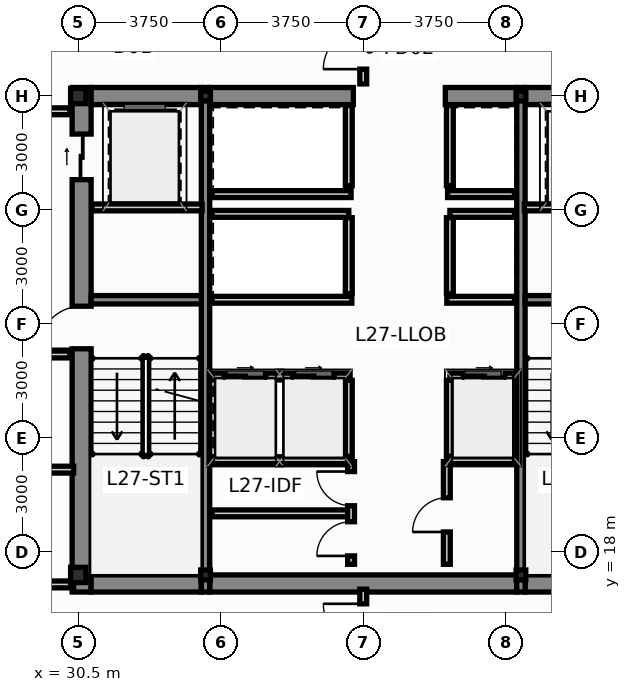
"""IFC4 building model, lengths in metres.
Left out: names, types, materials, properties, quantities, classifications, styles, units other than length and angle.
Written with IfcOpenShell. Run it as: python <this file> out.ifc"""

import sys

from ifc_helpers import new_model, si_unit, direction, frame, frame_2d, origin, origin_2d, place, context, subcontext, project, spatial, rectangle, i_section, extrude, source, transform, mapped, element, fill, save


model = new_model("IFC4")
c1 = context("Model", 3, precision=1e-05, world=origin(), true_north=direction((0.0, 1.0)))
c2 = subcontext(c1, "Body", "Model", "MODEL_VIEW")
j1 = project(units=[si_unit("LENGTHUNIT", "METRE"), si_unit("PLANEANGLEUNIT", "RADIAN")], contexts=[c1])
p1 = place(None, origin())
s1 = spatial("IfcSite", under=j1, at=p1, CompositionType="ELEMENT")
p2 = place(p1, origin())
s2 = spatial("IfcBuilding", under=s1, at=p2, CompositionType="ELEMENT")
p3 = place(p2, frame((0.0, 0.0, 105.4)))
s3 = spatial("IfcBuildingStorey", under=s2, at=p3, CompositionType="ELEMENT", Elevation=105.4)
m1 = source(origin(), c2, "Body", "SweptSolid", [
    extrude(i_section(OverallWidth=0.4, OverallDepth=0.4, WebThickness=0.02, FlangeThickness=0.032, at=origin_2d()), origin(), (0.0, 0.0, 1.0), 3.65),
])
for number, where, z_axis, x_axis in (
    (1, (30.5, 17.4, 0.0), (0.0, 0.0, 1.0), (1.0, 0.0, 0.0)),
    (2, (30.5, 30.0, 0.0), (0.0, 0.0, 1.0), (1.0, 0.0, 0.0)),
):
    element("IfcColumn", number, at=place(p3, frame(where, z_axis=z_axis, x_axis=x_axis)), inside=s3, PredefinedType="COLUMN", context=c2, shape_type="MappedRepresentation", body=[
        mapped(m1, transform((0.0, 0.0, 0.0), scale=1.0)),
    ])
m2 = source(origin(), c2, "Body", "SweptSolid", [
    extrude(i_section(OverallWidth=0.256, OverallDepth=0.26, WebThickness=0.01, FlangeThickness=0.017, at=origin_2d()), origin(), (0.0, 0.0, 1.0), 3.65),
])
for number, where, z_axis, x_axis in (
    (3, (33.85, 17.4, 0.0), (0.0, 0.0, 1.0), (1.0, 0.0, 0.0)),
    (4, (42.15, 17.4, 0.0), (0.0, 0.0, 1.0), (1.0, 0.0, 0.0)),
    (5, (33.85, 30.0, 0.0), (0.0, 0.0, 1.0), (1.0, 0.0, 0.0)),
    (6, (42.15, 30.0, 0.0), (0.0, 0.0, 1.0), (1.0, 0.0, 0.0)),
):
    element("IfcColumn", number, at=place(p3, frame(where, z_axis=z_axis, x_axis=x_axis)), inside=s3, PredefinedType="COLUMN", context=c2, shape_type="MappedRepresentation", body=[
        mapped(m2, transform((0.0, 0.0, 0.0), scale=1.0)),
    ])
p4 = place(p3, frame((30.59, 16.95, 0.0), z_axis=(0.0, 0.0, 1.0), x_axis=(0.0, 1.0, 0.0)))
e7 = element("IfcWall", 7, at=p4, inside=s3, PredefinedType="SHEAR", context=c2, shape_type="SweptSolid", body=[
    extrude(rectangle(XDim=13.275, YDim=0.5, at=frame_2d((6.638, 0.0))), origin(), (0.0, 0.0, 1.0), 3.65),
])
p5 = place(p4, frame((6.4, 0.0, 0.0)))
e8 = element("IfcOpeningElement", 8, at=p5, cuts=e7, PredefinedType="OPENING", context=c2, shape_type="SweptSolid", body=[
    extrude(rectangle(XDim=1.12, YDim=2.15, at=frame_2d((0.56, 1.075))), frame((0.0, 0.262, 0.0), z_axis=(0.0, -1.0, 0.0), x_axis=(1.0, 0.0, 0.0)), (0.0, 0.0, 1.0), 0.524),
])
p6 = place(p4, frame((10.85, 0.0, 0.0)))
e9 = element("IfcOpeningElement", 9, at=p6, cuts=e7, PredefinedType="OPENING", context=c2, shape_type="SweptSolid", body=[
    extrude(rectangle(XDim=1.2, YDim=2.2, at=frame_2d((0.6, 1.1))), frame((0.0, 0.262, 0.0), z_axis=(0.0, -1.0, 0.0), x_axis=(1.0, 0.0, 0.0)), (0.0, 0.0, 1.0), 0.524),
])
p7 = place(p3, frame((30.84, 17.175, 0.0), z_axis=(0.0, 0.0, 1.0), x_axis=(1.0, 0.0, 0.0)))
e10 = element("IfcWall", 10, at=p7, inside=s3, PredefinedType="SHEAR", context=c2, shape_type="SweptSolid", body=[
    extrude(rectangle(XDim=2.9, YDim=0.45, at=frame_2d((1.45, 0.0))), origin(), (0.0, 0.0, 1.0), 3.65),
])
p8 = place(p3, frame((33.96, 17.175, 0.0), z_axis=(0.0, 0.0, 1.0), x_axis=(1.0, 0.0, 0.0)))
e11 = element("IfcWall", 11, at=p8, inside=s3, PredefinedType="SHEAR", context=c2, shape_type="SweptSolid", body=[
    extrude(rectangle(XDim=8.08, YDim=0.45, at=frame_2d((4.04, 0.0))), origin(), (0.0, 0.0, 1.0), 3.65),
])
for number, where, z_axis, x_axis in (
    (12, (42.26, 17.175, 0.0), (0.0, 0.0, 1.0), (1.0, 0.0, 0.0)),
    (13, (30.84, 30.0, 0.0), (0.0, 0.0, 1.0), (1.0, 0.0, 0.0)),
):
    element("IfcWall", number, at=place(p3, frame(where, z_axis=z_axis, x_axis=x_axis)), inside=s3, PredefinedType="SHEAR", context=c2, shape_type="SweptSolid", body=[
        extrude(rectangle(XDim=2.9, YDim=0.45, at=frame_2d((1.45, 0.0))), origin(), (0.0, 0.0, 1.0), 3.65),
    ])
p9 = place(p3, frame((33.96, 30.0, 0.0), z_axis=(0.0, 0.0, 1.0), x_axis=(1.0, 0.0, 0.0)))
e14 = element("IfcWall", 14, at=p9, inside=s3, PredefinedType="SHEAR", context=c2, shape_type="SweptSolid", body=[
    extrude(rectangle(XDim=3.78, YDim=0.45, at=frame_2d((1.89, 0.0))), origin(), (0.0, 0.0, 1.0), 3.65),
])
p10 = place(p3, frame((40.16, 30.0, 0.0), z_axis=(0.0, 0.0, 1.0), x_axis=(1.0, 0.0, 0.0)))
e15 = element("IfcWall", 15, at=p10, inside=s3, PredefinedType="SHEAR", context=c2, shape_type="SweptSolid", body=[
    extrude(rectangle(XDim=1.88, YDim=0.45, at=frame_2d((0.94, 0.0))), origin(), (0.0, 0.0, 1.0), 3.65),
])
p11 = place(p3, frame((42.26, 30.0, 0.0), z_axis=(0.0, 0.0, 1.0), x_axis=(1.0, 0.0, 0.0)))
e16 = element("IfcWall", 16, at=p11, inside=s3, PredefinedType="SHEAR", context=c2, shape_type="SweptSolid", body=[
    extrude(rectangle(XDim=2.9, YDim=0.45, at=frame_2d((1.45, 0.0))), origin(), (0.0, 0.0, 1.0), 3.65),
])
for number, where, z_axis, x_axis in (
    (17, (33.85, 16.95, 0.0), (0.0, 0.0, 1.0), (0.0, 1.0, 0.0)),
    (18, (42.15, 16.95, 0.0), (0.0, 0.0, 1.0), (0.0, 1.0, 0.0)),
):
    element("IfcWall", number, at=place(p3, frame(where, z_axis=z_axis, x_axis=x_axis)), inside=s3, PredefinedType="SHEAR", context=c2, shape_type="SweptSolid", body=[
        extrude(rectangle(XDim=13.275, YDim=0.22, at=frame_2d((6.638, 0.0))), origin(), (0.0, 0.0, 1.0), 3.65),
    ])
for number, where, z_axis, x_axis in (
    (19, (30.84, 24.64, 0.0), (0.0, 0.0, 1.0), (1.0, 0.0, 0.0)),
    (20, (42.26, 24.64, 0.0), (0.0, 0.0, 1.0), (1.0, 0.0, 0.0)),
):
    element("IfcWall", number, at=place(p3, frame(where, z_axis=z_axis, x_axis=x_axis)), inside=s3, PredefinedType="SHEAR", context=c2, shape_type="SweptSolid", body=[
        extrude(rectangle(XDim=2.9, YDim=0.22, at=frame_2d((1.45, 0.0))), origin(), (0.0, 0.0, 1.0), 3.65),
    ])
p12 = place(p3, frame((34.02, 22.62, 0.0), z_axis=(0.0, 0.0, 1.0), x_axis=(1.0, 0.0, 0.0)))
e21 = element("IfcWall", 21, at=p12, inside=s3, PredefinedType="PARTITIONING", context=c2, shape_type="SweptSolid", body=[
    extrude(rectangle(XDim=3.6, YDim=0.18, at=frame_2d((1.8, 0.0))), origin(), (0.0, 0.0, 1.0), 3.4),
])
p13 = place(p12, frame((0.32, 0.0, 0.0)))
e22 = element("IfcOpeningElement", 22, at=p13, cuts=e21, PredefinedType="OPENING", context=c2, shape_type="SweptSolid", body=[
    extrude(rectangle(XDim=1.1, YDim=2.2, at=frame_2d((0.55, 1.1))), frame((0.0, 0.102, 0.0), z_axis=(0.0, -1.0, 0.0), x_axis=(1.0, 0.0, 0.0)), (0.0, 0.0, 1.0), 0.204),
])
p14 = place(p12, frame((2.12, 0.0, 0.0)))
e23 = element("IfcOpeningElement", 23, at=p14, cuts=e21, PredefinedType="OPENING", context=c2, shape_type="SweptSolid", body=[
    extrude(rectangle(XDim=1.1, YDim=2.2, at=frame_2d((0.55, 1.1))), frame((0.0, 0.102, 0.0), z_axis=(0.0, -1.0, 0.0), x_axis=(1.0, 0.0, 0.0)), (0.0, 0.0, 1.0), 0.204),
])
p15 = place(p3, frame((40.28, 22.62, 0.0), z_axis=(0.0, 0.0, 1.0), x_axis=(1.0, 0.0, 0.0)))
e24 = element("IfcWall", 24, at=p15, inside=s3, PredefinedType="PARTITIONING", context=c2, shape_type="SweptSolid", body=[
    extrude(rectangle(XDim=1.7, YDim=0.18, at=frame_2d((0.85, 0.0))), origin(), (0.0, 0.0, 1.0), 3.4),
])
p16 = place(p15, frame((0.35, 0.0, 0.0)))
e25 = element("IfcOpeningElement", 25, at=p16, cuts=e24, PredefinedType="OPENING", context=c2, shape_type="SweptSolid", body=[
    extrude(rectangle(XDim=1.1, YDim=2.2, at=frame_2d((0.55, 1.1))), frame((0.0, 0.102, 0.0), z_axis=(0.0, -1.0, 0.0), x_axis=(1.0, 0.0, 0.0)), (0.0, 0.0, 1.0), 0.204),
])
for number, where, z_axis, x_axis in (
    (26, (37.62, 20.52, 0.0), (0.0, 0.0, 1.0), (0.0, 1.0, 0.0)),
    (27, (40.28, 20.52, 0.0), (0.0, 0.0, 1.0), (0.0, 1.0, 0.0)),
):
    element("IfcWall", number, at=place(p3, frame(where, z_axis=z_axis, x_axis=x_axis)), inside=s3, PredefinedType="PARTITIONING", context=c2, shape_type="SweptSolid", body=[
        extrude(rectangle(XDim=2.0, YDim=0.18, at=frame_2d((1.0, 0.0))), origin(), (0.0, 0.0, 1.0), 3.4),
    ])
p17 = place(p3, frame((34.02, 26.9, 0.0), z_axis=(0.0, 0.0, 1.0), x_axis=(1.0, 0.0, 0.0)))
e28 = element("IfcWall", 28, at=p17, inside=s3, PredefinedType="PARTITIONING", context=c2, shape_type="SweptSolid", body=[
    extrude(rectangle(XDim=3.6, YDim=0.18, at=frame_2d((1.8, 0.0))), origin(), (0.0, 0.0, 1.0), 3.4),
])
p18 = place(p3, frame((40.28, 26.9, 0.0), z_axis=(0.0, 0.0, 1.0), x_axis=(1.0, 0.0, 0.0)))
e29 = element("IfcWall", 29, at=p18, inside=s3, PredefinedType="PARTITIONING", context=c2, shape_type="SweptSolid", body=[
    extrude(rectangle(XDim=1.7, YDim=0.18, at=frame_2d((0.85, 0.0))), origin(), (0.0, 0.0, 1.0), 3.4),
])
for number, where, z_axis, x_axis in (
    (30, (37.62, 24.8, 0.0), (0.0, 0.0, 1.0), (0.0, 1.0, 0.0)),
    (31, (40.28, 24.8, 0.0), (0.0, 0.0, 1.0), (0.0, 1.0, 0.0)),
):
    element("IfcWall", number, at=place(p3, frame(where, z_axis=z_axis, x_axis=x_axis)), inside=s3, PredefinedType="PARTITIONING", context=c2, shape_type="SweptSolid", body=[
        extrude(rectangle(XDim=2.0, YDim=0.18, at=frame_2d((1.0, 0.0))), origin(), (0.0, 0.0, 1.0), 3.4),
    ])
p19 = place(p3, frame((34.02, 24.64, 0.0), z_axis=(0.0, 0.0, 1.0), x_axis=(1.0, 0.0, 0.0)))
e32 = element("IfcWall", 32, at=p19, inside=s3, PredefinedType="PARTITIONING", context=c2, shape_type="SweptSolid", body=[
    extrude(rectangle(XDim=3.68, YDim=0.18, at=frame_2d((1.84, 0.0))), origin(), (0.0, 0.0, 1.0), 3.4),
])
p20 = place(p3, frame((40.2, 24.64, 0.0), z_axis=(0.0, 0.0, 1.0), x_axis=(1.0, 0.0, 0.0)))
e33 = element("IfcWall", 33, at=p20, inside=s3, PredefinedType="PARTITIONING", context=c2, shape_type="SweptSolid", body=[
    extrude(rectangle(XDim=1.78, YDim=0.18, at=frame_2d((0.89, 0.0))), origin(), (0.0, 0.0, 1.0), 3.4),
])
p21 = place(p3, frame((34.02, 27.42, 0.0), z_axis=(0.0, 0.0, 1.0), x_axis=(1.0, 0.0, 0.0)))
e34 = element("IfcWall", 34, at=p21, inside=s3, PredefinedType="PARTITIONING", context=c2, shape_type="SweptSolid", body=[
    extrude(rectangle(XDim=3.66, YDim=0.18, at=frame_2d((1.83, 0.0))), origin(), (0.0, 0.0, 1.0), 3.4),
])
p22 = place(p3, frame((40.22, 27.42, 0.0), z_axis=(0.0, 0.0, 1.0), x_axis=(1.0, 0.0, 0.0)))
e35 = element("IfcWall", 35, at=p22, inside=s3, PredefinedType="PARTITIONING", context=c2, shape_type="SweptSolid", body=[
    extrude(rectangle(XDim=1.76, YDim=0.18, at=frame_2d((0.88, 0.0))), origin(), (0.0, 0.0, 1.0), 3.4),
])
for number, where, z_axis, x_axis in (
    (36, (37.62, 27.64, 0.0), (0.0, 0.0, 1.0), (0.0, 1.0, 0.0)),
    (37, (40.28, 27.64, 0.0), (0.0, 0.0, 1.0), (0.0, 1.0, 0.0)),
):
    element("IfcWall", number, at=place(p3, frame(where, z_axis=z_axis, x_axis=x_axis)), inside=s3, PredefinedType="PARTITIONING", context=c2, shape_type="SweptSolid", body=[
        extrude(rectangle(XDim=2.11, YDim=0.18, at=frame_2d((1.055, 0.0))), origin(), (0.0, 0.0, 1.0), 3.4),
    ])
p23 = place(p3, frame((27.52, 23.2, 0.0), z_axis=(0.0, 0.0, 1.0), x_axis=(1.0, 0.0, 0.0)))
e38 = element("IfcWall", 38, at=p23, inside=s3, PredefinedType="PARTITIONING", context=c2, shape_type="SweptSolid", body=[
    extrude(rectangle(XDim=2.76, YDim=0.18, at=frame_2d((1.38, 0.0))), origin(), (0.0, 0.0, 1.0), 3.4),
])
p24 = place(p3, frame((27.52, 29.6, 0.0), z_axis=(0.0, 0.0, 1.0), x_axis=(1.0, 0.0, 0.0)))
e39 = element("IfcWall", 39, at=p24, inside=s3, PredefinedType="PARTITIONING", context=c2, shape_type="SweptSolid", body=[
    extrude(rectangle(XDim=2.76, YDim=0.18, at=frame_2d((1.38, 0.0))), origin(), (0.0, 0.0, 1.0), 2.783),
])
for number, where, z_axis, x_axis in (
    (40, (30.86, 27.07, 0.0), (0.0, 0.0, 1.0), (1.0, 0.0, 0.0)),
    (41, (42.24, 27.07, 0.0), (0.0, 0.0, 1.0), (1.0, 0.0, 0.0)),
):
    element("IfcWall", number, at=place(p3, frame(where, z_axis=z_axis, x_axis=x_axis)), inside=s3, PredefinedType="PARTITIONING", context=c2, shape_type="SweptSolid", body=[
        extrude(rectangle(XDim=2.9, YDim=0.18, at=frame_2d((1.45, 0.0))), origin(), (0.0, 0.0, 1.0), 3.4),
    ])
p25 = place(p3, frame((34.02, 20.42, 0.0), z_axis=(0.0, 0.0, 1.0), x_axis=(1.0, 0.0, 0.0)))
e42 = element("IfcWall", 42, at=p25, inside=s3, PredefinedType="PARTITIONING", context=c2, shape_type="SweptSolid", body=[
    extrude(rectangle(XDim=3.64, YDim=0.18, at=frame_2d((1.82, 0.0))), origin(), (0.0, 0.0, 1.0), 3.4),
])
p26 = place(p3, frame((40.22, 20.42, 0.0), z_axis=(0.0, 0.0, 1.0), x_axis=(1.0, 0.0, 0.0)))
e43 = element("IfcWall", 43, at=p26, inside=s3, PredefinedType="PARTITIONING", context=c2, shape_type="SweptSolid", body=[
    extrude(rectangle(XDim=1.76, YDim=0.18, at=frame_2d((0.88, 0.0))), origin(), (0.0, 0.0, 1.0), 3.4),
])
p27 = place(p3, frame((34.02, 19.02, 0.0), z_axis=(0.0, 0.0, 1.0), x_axis=(1.0, 0.0, 0.0)))
e44 = element("IfcWall", 44, at=p27, inside=s3, PredefinedType="PARTITIONING", context=c2, shape_type="SweptSolid", body=[
    extrude(rectangle(XDim=3.58, YDim=0.18, at=frame_2d((1.79, 0.0))), origin(), (0.0, 0.0, 1.0), 3.4),
])
p28 = place(p3, frame((37.68, 17.68, 0.0), z_axis=(0.0, 0.0, 1.0), x_axis=(0.0, 1.0, 0.0)))
e45 = element("IfcWall", 45, at=p28, inside=s3, PredefinedType="PARTITIONING", context=c2, shape_type="SweptSolid", body=[
    extrude(rectangle(XDim=2.7, YDim=0.18, at=frame_2d((1.35, 0.0))), origin(), (0.0, 0.0, 1.0), 3.4),
])
p29 = place(p28, frame((0.22, 0.0, 0.0)))
e46 = element("IfcOpeningElement", 46, at=p29, cuts=e45, PredefinedType="OPENING", context=c2, shape_type="SweptSolid", body=[
    extrude(rectangle(XDim=0.9, YDim=2.1, at=frame_2d((0.45, 1.05))), frame((0.0, 0.102, 0.0), z_axis=(0.0, -1.0, 0.0), x_axis=(1.0, 0.0, 0.0)), (0.0, 0.0, 1.0), 0.204),
])
p30 = place(p28, frame((1.54, 0.0, 0.0)))
e47 = element("IfcOpeningElement", 47, at=p30, cuts=e45, PredefinedType="OPENING", context=c2, shape_type="SweptSolid", body=[
    extrude(rectangle(XDim=0.9, YDim=2.1, at=frame_2d((0.45, 1.05))), frame((0.0, 0.102, 0.0), z_axis=(0.0, -1.0, 0.0), x_axis=(1.0, 0.0, 0.0)), (0.0, 0.0, 1.0), 0.204),
])
p31 = place(p3, frame((40.2, 17.68, 0.0), z_axis=(0.0, 0.0, 1.0), x_axis=(0.0, 1.0, 0.0)))
e48 = element("IfcWall", 48, at=p31, inside=s3, PredefinedType="PARTITIONING", context=c2, shape_type="SweptSolid", body=[
    extrude(rectangle(XDim=2.7, YDim=0.18, at=frame_2d((1.35, 0.0))), origin(), (0.0, 0.0, 1.0), 3.4),
])
p32 = place(p31, frame((0.85, 0.0, 0.0)))
e49 = element("IfcOpeningElement", 49, at=p32, cuts=e48, PredefinedType="OPENING", context=c2, shape_type="SweptSolid", body=[
    extrude(rectangle(XDim=0.9, YDim=2.1, at=frame_2d((0.45, 1.05))), frame((0.0, 0.102, 0.0), z_axis=(0.0, -1.0, 0.0), x_axis=(1.0, 0.0, 0.0)), (0.0, 0.0, 1.0), 0.204),
])
p33 = place(p3, frame((27.48, 20.17, 0.0), z_axis=(0.0, 0.0, 1.0), x_axis=(1.0, 0.0, 0.0)))
e50 = element("IfcWall", 50, at=p33, inside=s3, PredefinedType="PARTITIONING", context=c2, shape_type="SweptSolid", body=[
    extrude(rectangle(XDim=2.9, YDim=0.18, at=frame_2d((1.45, 0.0))), origin(), (0.0, 0.0, 1.0), 3.4),
])
p34 = place(p3, frame((27.48, 17.15, 0.0), z_axis=(0.0, 0.0, 1.0), x_axis=(1.0, 0.0, 0.0)))
e51 = element("IfcWall", 51, at=p34, inside=s3, PredefinedType="PARTITIONING", context=c2, shape_type="SweptSolid", body=[
    extrude(rectangle(XDim=2.9, YDim=0.18, at=frame_2d((1.45, 0.0))), origin(), (0.0, 0.0, 1.0), 2.783),
])
p35 = place(p3, frame((38.0, 15.205, 0.0), z_axis=(0.0, 0.0, 1.0), x_axis=(0.0, 1.0, 0.0)))
e52 = element("IfcWall", 52, at=p35, inside=s3, PredefinedType="PARTITIONING", context=c2, shape_type="SweptSolid", body=[
    extrude(rectangle(XDim=1.82, YDim=0.18, at=frame_2d((0.91, 0.0))), origin(), (0.0, 0.0, 1.0), 3.4),
])
p36 = place(p35, frame((0.385, 0.0, 0.0)))
e53 = element("IfcOpeningElement", 53, at=p36, cuts=e52, PredefinedType="OPENING", context=c2, shape_type="SweptSolid", body=[
    extrude(rectangle(XDim=1.05, YDim=2.15, at=frame_2d((0.525, 1.075))), frame((0.0, 0.102, 0.0), z_axis=(0.0, -1.0, 0.0), x_axis=(1.0, 0.0, 0.0)), (0.0, 0.0, 1.0), 0.204),
])
p37 = place(p3, frame((38.0, 30.32, 0.0), z_axis=(0.0, 0.0, 1.0), x_axis=(0.0, 1.0, 0.0)))
e54 = element("IfcWall", 54, at=p37, inside=s3, PredefinedType="PARTITIONING", context=c2, shape_type="SweptSolid", body=[
    extrude(rectangle(XDim=1.825, YDim=0.18, at=frame_2d((0.913, 0.0))), origin(), (0.0, 0.0, 1.0), 3.4),
])
p38 = place(p37, frame((0.388, 0.0, 0.0)))
e55 = element("IfcOpeningElement", 55, at=p38, cuts=e54, PredefinedType="OPENING", context=c2, shape_type="SweptSolid", body=[
    extrude(rectangle(XDim=1.05, YDim=2.15, at=frame_2d((0.525, 1.075))), frame((0.0, 0.102, 0.0), z_axis=(0.0, -1.0, 0.0), x_axis=(1.0, 0.0, 0.0)), (0.0, 0.0, 1.0), 0.204),
])
p39 = place(p5, origin())
e56 = element("IfcDoor", 56, at=p39, inside=s3, OperationType="SINGLE_SWING_LEFT", PredefinedType="DOOR", context=c2, shape_type="SweptSolid", body=[
    extrude(rectangle(XDim=1.12, YDim=2.15, at=frame_2d((0.56, 1.075))), frame((0.0, 0.025, 0.0), z_axis=(0.0, -1.0, 0.0), x_axis=(1.0, 0.0, 0.0)), (0.0, 0.0, 1.0), 0.05),
])
fill(e8, e56)
p40 = place(p6, origin())
e57 = element("IfcDoor", 57, at=p40, inside=s3, OperationType="SLIDING_TO_LEFT", PredefinedType="DOOR", context=c2, shape_type="SweptSolid", body=[
    extrude(rectangle(XDim=1.2, YDim=2.2, at=frame_2d((0.6, 1.1))), frame((0.0, 0.025, 0.0), z_axis=(0.0, -1.0, 0.0), x_axis=(1.0, 0.0, 0.0)), (0.0, 0.0, 1.0), 0.05),
])
fill(e9, e57)
p41 = place(p13, origin())
e58 = element("IfcDoor", 58, at=p41, inside=s3, OperationType="SLIDING_TO_LEFT", PredefinedType="DOOR", context=c2, shape_type="SweptSolid", body=[
    extrude(rectangle(XDim=1.1, YDim=2.2, at=frame_2d((0.55, 1.1))), frame((0.0, 0.025, 0.0), z_axis=(0.0, -1.0, 0.0), x_axis=(1.0, 0.0, 0.0)), (0.0, 0.0, 1.0), 0.05),
])
fill(e22, e58)
p42 = place(p14, origin())
e59 = element("IfcDoor", 59, at=p42, inside=s3, OperationType="SLIDING_TO_RIGHT", PredefinedType="DOOR", context=c2, shape_type="SweptSolid", body=[
    extrude(rectangle(XDim=1.1, YDim=2.2, at=frame_2d((0.55, 1.1))), frame((0.0, 0.025, 0.0), z_axis=(0.0, -1.0, 0.0), x_axis=(1.0, 0.0, 0.0)), (0.0, 0.0, 1.0), 0.05),
])
fill(e23, e59)
p43 = place(p16, origin())
e60 = element("IfcDoor", 60, at=p43, inside=s3, OperationType="SLIDING_TO_LEFT", PredefinedType="DOOR", context=c2, shape_type="SweptSolid", body=[
    extrude(rectangle(XDim=1.1, YDim=2.2, at=frame_2d((0.55, 1.1))), frame((0.0, 0.025, 0.0), z_axis=(0.0, -1.0, 0.0), x_axis=(1.0, 0.0, 0.0)), (0.0, 0.0, 1.0), 0.05),
])
fill(e25, e60)
p44 = place(p29, origin())
e61 = element("IfcDoor", 61, at=p44, inside=s3, OperationType="SINGLE_SWING_LEFT", PredefinedType="DOOR", context=c2, shape_type="SweptSolid", body=[
    extrude(rectangle(XDim=0.9, YDim=2.1, at=frame_2d((0.45, 1.05))), frame((0.0, 0.025, 0.0), z_axis=(0.0, -1.0, 0.0), x_axis=(1.0, 0.0, 0.0)), (0.0, 0.0, 1.0), 0.05),
])
fill(e46, e61)
p45 = place(p30, origin())
e62 = element("IfcDoor", 62, at=p45, inside=s3, OperationType="SINGLE_SWING_RIGHT", PredefinedType="DOOR", context=c2, shape_type="SweptSolid", body=[
    extrude(rectangle(XDim=0.9, YDim=2.1, at=frame_2d((0.45, 1.05))), frame((0.0, 0.025, 0.0), z_axis=(0.0, -1.0, 0.0), x_axis=(1.0, 0.0, 0.0)), (0.0, 0.0, 1.0), 0.05),
])
fill(e47, e62)
p46 = place(p32, origin())
e63 = element("IfcDoor", 63, at=p46, inside=s3, OperationType="SINGLE_SWING_LEFT", PredefinedType="DOOR", context=c2, shape_type="SweptSolid", body=[
    extrude(rectangle(XDim=0.9, YDim=2.1, at=frame_2d((0.45, 1.05))), frame((0.0, 0.025, 0.0), z_axis=(0.0, -1.0, 0.0), x_axis=(1.0, 0.0, 0.0)), (0.0, 0.0, 1.0), 0.05),
])
fill(e49, e63)
p47 = place(p36, origin())
e64 = element("IfcDoor", 64, at=p47, inside=s3, OperationType="SINGLE_SWING_RIGHT", PredefinedType="DOOR", context=c2, shape_type="SweptSolid", body=[
    extrude(rectangle(XDim=1.05, YDim=2.15, at=frame_2d((0.525, 1.075))), frame((0.0, 0.025, 0.0), z_axis=(0.0, -1.0, 0.0), x_axis=(1.0, 0.0, 0.0)), (0.0, 0.0, 1.0), 0.05),
])
fill(e53, e64)
p48 = place(p38, origin())
e65 = element("IfcDoor", 65, at=p48, inside=s3, OperationType="SINGLE_SWING_LEFT", PredefinedType="DOOR", context=c2, shape_type="SweptSolid", body=[
    extrude(rectangle(XDim=1.05, YDim=2.15, at=frame_2d((0.525, 1.075))), frame((0.0, 0.025, 0.0), z_axis=(0.0, -1.0, 0.0), x_axis=(1.0, 0.0, 0.0)), (0.0, 0.0, 1.0), 0.05),
])
fill(e55, e65)
save(model, sys.argv[1])
